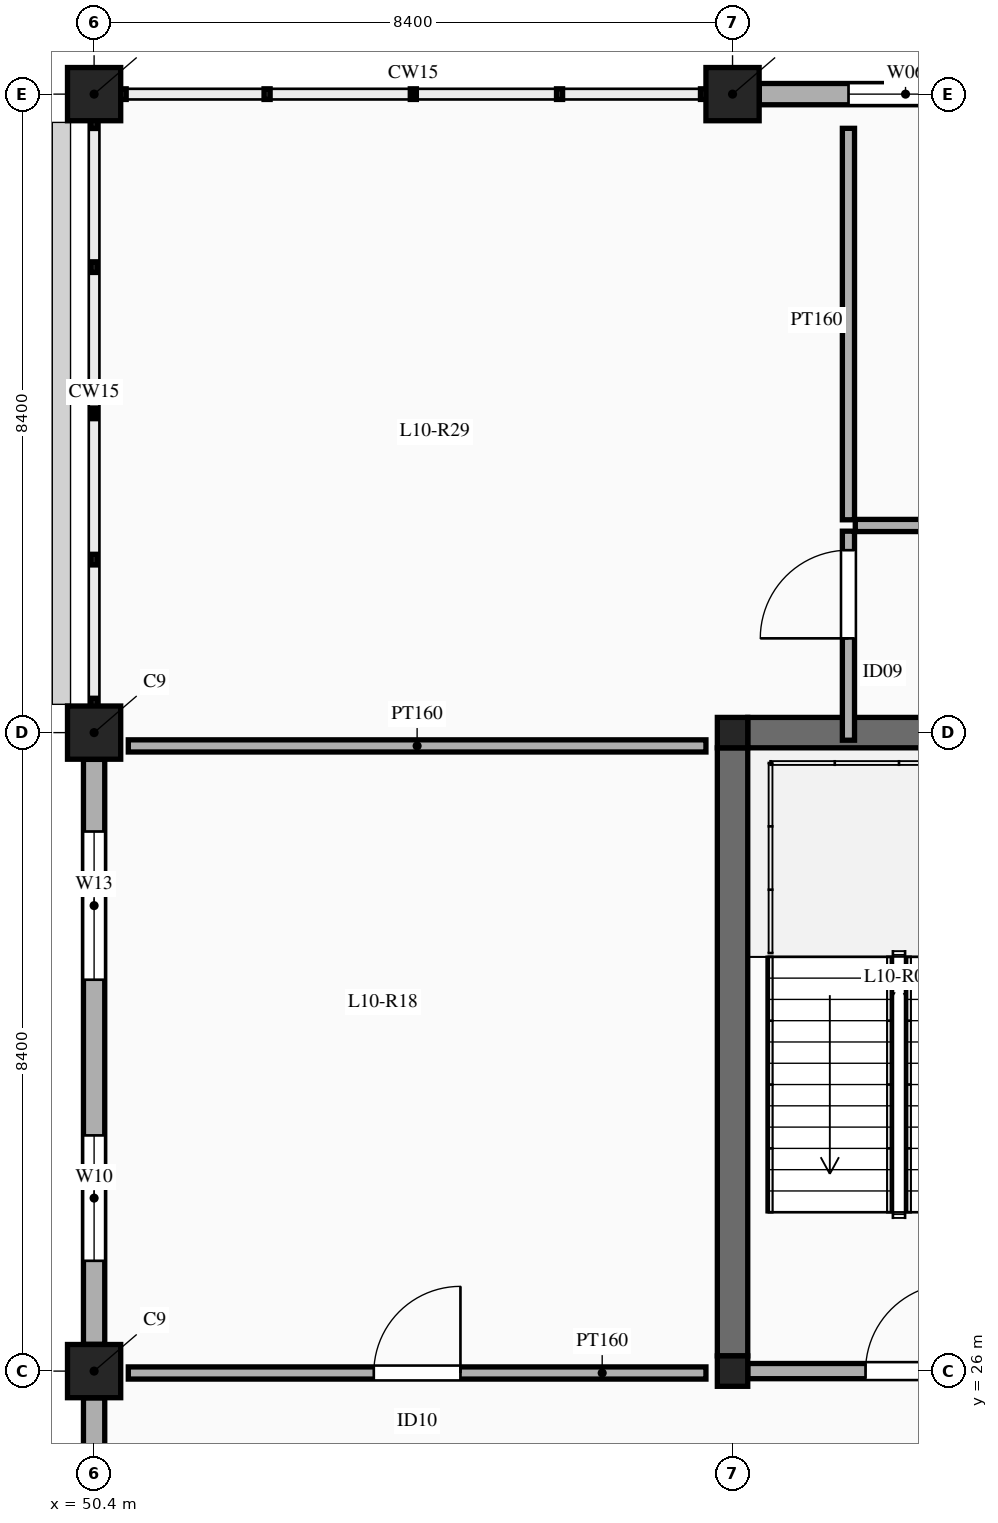
"""IFC4 building model, lengths in metres.
Left out: names, types, materials, properties, quantities, classifications, styles, units other than length and angle.
Written with IfcOpenShell. Run it as: python <this file> out.ifc"""

import sys

from ifc_helpers import new_model, si_unit, direction, frame, frame_2d, origin, origin_2d, place, context, subcontext, project, spatial, rectangle, extrude, element, fill, save


model = new_model("IFC4")
c1 = context("Model", 3, precision=1e-05, world=origin(), true_north=direction((0.0, 1.0)))
c2 = subcontext(c1, "Body", "Model", "MODEL_VIEW")
j1 = project(units=[si_unit("LENGTHUNIT", "METRE"), si_unit("PLANEANGLEUNIT", "RADIAN")], contexts=[c1])
p1 = place(None, origin())
s1 = spatial("IfcSite", under=j1, at=p1, CompositionType="ELEMENT")
p2 = place(p1, origin())
s2 = spatial("IfcBuilding", under=s1, at=p2, CompositionType="ELEMENT")
p3 = place(p2, frame((0.0, 0.0, 46.5)))
s3 = spatial("IfcBuildingStorey", under=s2, at=p3, CompositionType="ELEMENT", Elevation=46.5)
for number, where, z_axis, x_axis in (
    (1, (50.4, 26.0, 0.0), (0.0, 0.0, 1.0), (1.0, 0.0, 0.0)),
    (2, (50.4, 34.4, 0.0), (0.0, 0.0, 1.0), (1.0, 0.0, 0.0)),
    (3, (50.4, 42.8, 0.0), (0.0, 0.0, 1.0), (1.0, 0.0, 0.0)),
):
    element("IfcColumn", number, at=place(p3, frame(where, z_axis=z_axis, x_axis=x_axis)), inside=s3, PredefinedType="COLUMN", context=c2, shape_type="SweptSolid", body=[
        extrude(rectangle(XDim=0.7, YDim=0.7, at=origin_2d()), origin(), (0.0, 0.0, 1.0), 4.5),
    ])
for number, where, z_axis, x_axis in (
    (4, (58.8, 26.0, 0.0), (0.0, 0.0, 1.0), (1.0, 0.0, 0.0)),
    (5, (58.8, 34.4, 0.0), (0.0, 0.0, 1.0), (1.0, 0.0, 0.0)),
):
    element("IfcColumn", number, at=place(p3, frame(where, z_axis=z_axis, x_axis=x_axis)), inside=s3, PredefinedType="COLUMN", context=c2, shape_type="SweptSolid", body=[
        extrude(rectangle(XDim=0.4, YDim=0.4, at=origin_2d()), origin(), (0.0, 0.0, 1.0), 4.5),
    ])
p4 = place(p3, frame((58.8, 42.8, 0.0), z_axis=(0.0, 0.0, 1.0), x_axis=(1.0, 0.0, 0.0)))
e6 = element("IfcColumn", 6, at=p4, inside=s3, PredefinedType="COLUMN", context=c2, shape_type="SweptSolid", body=[
    extrude(rectangle(XDim=0.7, YDim=0.7, at=origin_2d()), origin(), (0.0, 0.0, 1.0), 4.5),
])
for number, where, z_axis, x_axis in (
    (7, (58.8, 26.2, 0.0), (0.0, 0.0, 1.0), (0.0, 1.0, 0.0)),
    (8, (59.0, 34.4, 0.0), (0.0, 0.0, 1.0), (1.0, 0.0, 0.0)),
):
    element("IfcWall", number, at=place(p3, frame(where, z_axis=z_axis, x_axis=x_axis)), inside=s3, PredefinedType="SHEAR", context=c2, shape_type="SweptSolid", body=[
        extrude(rectangle(XDim=8.0, YDim=0.4, at=frame_2d((4.0, 0.0))), origin(), (0.0, 0.0, 1.0), 4.5),
    ])
p5 = place(p3, frame((59.152, 42.8, 0.0), z_axis=(0.0, 0.0, 1.0), x_axis=(1.0, 0.0, 0.0)))
e9 = element("IfcWall", 9, at=p5, inside=s3, PredefinedType="ELEMENTEDWALL", context=c2, shape_type="SweptSolid", body=[
    extrude(rectangle(XDim=7.696, YDim=0.28, at=frame_2d((3.848, 0.0))), origin(), (0.0, 0.0, 1.0), 3.55),
])
p6 = place(p5, frame((1.174, 0.0, 0.9)))
e10 = element("IfcOpeningElement", 10, at=p6, cuts=e9, PredefinedType="OPENING", context=c2, shape_type="SweptSolid", body=[
    extrude(rectangle(XDim=1.5, YDim=2.0, at=frame_2d((0.75, 1.0))), frame((0.0, 0.15, 0.0), z_axis=(0.0, -1.0, 0.0), x_axis=(1.0, 0.0, 0.0)), (0.0, 0.0, 1.0), 0.3),
])
p7 = place(p5, frame((4.747, 0.0, 0.9)))
e11 = element("IfcOpeningElement", 11, at=p7, cuts=e9, PredefinedType="OPENING", context=c2, shape_type="SweptSolid", body=[
    extrude(rectangle(XDim=2.05, YDim=2.1, at=frame_2d((1.025, 1.05))), frame((0.0, 0.15, 0.0), z_axis=(0.0, -1.0, 0.0), x_axis=(1.0, 0.0, 0.0)), (0.0, 0.0, 1.0), 0.3),
])
p8 = place(p3, frame((50.4, 17.952, 0.0), z_axis=(0.0, 0.0, 1.0), x_axis=(0.0, 1.0, 0.0)))
e12 = element("IfcWall", 12, at=p8, inside=s3, PredefinedType="ELEMENTEDWALL", context=c2, shape_type="SweptSolid", body=[
    extrude(rectangle(XDim=7.696, YDim=0.28, at=frame_2d((3.848, 0.0))), origin(), (0.0, 0.0, 1.0), 3.55),
])
p9 = place(p8, frame((1.099, 0.0, 0.9)))
e13 = element("IfcOpeningElement", 13, at=p9, cuts=e12, PredefinedType="OPENING", context=c2, shape_type="SweptSolid", body=[
    extrude(rectangle(XDim=1.65, YDim=1.95, at=frame_2d((0.825, 0.975))), frame((0.0, 0.15, 0.0), z_axis=(0.0, -1.0, 0.0), x_axis=(1.0, 0.0, 0.0)), (0.0, 0.0, 1.0), 0.3),
])
p10 = place(p8, frame((4.797, 0.0, 0.9)))
e14 = element("IfcOpeningElement", 14, at=p10, cuts=e12, PredefinedType="OPENING", context=c2, shape_type="SweptSolid", body=[
    extrude(rectangle(XDim=1.95, YDim=2.0, at=frame_2d((0.975, 1.0))), frame((0.0, 0.15, 0.0), z_axis=(0.0, -1.0, 0.0), x_axis=(1.0, 0.0, 0.0)), (0.0, 0.0, 1.0), 0.3),
])
p11 = place(p3, frame((50.4, 26.352, 0.0), z_axis=(0.0, 0.0, 1.0), x_axis=(0.0, 1.0, 0.0)))
e15 = element("IfcWall", 15, at=p11, inside=s3, PredefinedType="ELEMENTEDWALL", context=c2, shape_type="SweptSolid", body=[
    extrude(rectangle(XDim=7.696, YDim=0.28, at=frame_2d((3.848, 0.0))), origin(), (0.0, 0.0, 1.0), 3.55),
])
p12 = place(p11, frame((1.099, 0.0, 0.9)))
e16 = element("IfcOpeningElement", 16, at=p12, cuts=e15, PredefinedType="OPENING", context=c2, shape_type="SweptSolid", body=[
    extrude(rectangle(XDim=1.65, YDim=1.95, at=frame_2d((0.825, 0.975))), frame((0.0, 0.15, 0.0), z_axis=(0.0, -1.0, 0.0), x_axis=(1.0, 0.0, 0.0)), (0.0, 0.0, 1.0), 0.3),
])
p13 = place(p11, frame((4.797, 0.0, 0.9)))
e17 = element("IfcOpeningElement", 17, at=p13, cuts=e15, PredefinedType="OPENING", context=c2, shape_type="SweptSolid", body=[
    extrude(rectangle(XDim=1.95, YDim=2.0, at=frame_2d((0.975, 1.0))), frame((0.0, 0.15, 0.0), z_axis=(0.0, -1.0, 0.0), x_axis=(1.0, 0.0, 0.0)), (0.0, 0.0, 1.0), 0.3),
])
p14 = place(p3, frame((59.0, 26.0, 0.0), z_axis=(0.0, 0.0, 1.0), x_axis=(1.0, 0.0, 0.0)))
e18 = element("IfcWall", 18, at=p14, inside=s3, PredefinedType="SOLIDWALL", context=c2, shape_type="SweptSolid", body=[
    extrude(rectangle(XDim=8.0, YDim=0.2, at=frame_2d((4.0, 0.0))), origin(), (0.0, 0.0, 1.0), 3.83),
])
p15 = place(p14, frame((1.55, 0.0, 0.0)))
e19 = element("IfcOpeningElement", 19, at=p15, cuts=e18, PredefinedType="OPENING", context=c2, shape_type="SweptSolid", body=[
    extrude(rectangle(XDim=1.15, YDim=2.15, at=frame_2d((0.575, 1.075))), frame((0.0, 0.11, 0.0), z_axis=(0.0, -1.0, 0.0), x_axis=(1.0, 0.0, 0.0)), (0.0, 0.0, 1.0), 0.22),
])
p16 = place(p14, frame((5.35, 0.0, 0.0)))
e20 = element("IfcOpeningElement", 20, at=p16, cuts=e18, PredefinedType="OPENING", context=c2, shape_type="SweptSolid", body=[
    extrude(rectangle(XDim=1.22, YDim=2.15, at=frame_2d((0.61, 1.075))), frame((0.0, 0.11, 0.0), z_axis=(0.0, -1.0, 0.0), x_axis=(1.0, 0.0, 0.0)), (0.0, 0.0, 1.0), 0.22),
])
p17 = place(p3, frame((50.85, 25.975, 0.0), z_axis=(0.0, 0.0, 1.0), x_axis=(1.0, 0.0, 0.0)))
e21 = element("IfcWall", 21, at=p17, inside=s3, PredefinedType="PARTITIONING", context=c2, shape_type="SweptSolid", body=[
    extrude(rectangle(XDim=7.6, YDim=0.16, at=frame_2d((3.8, 0.0))), origin(), (0.0, 0.0, 1.0), 3.45),
])
p18 = place(p17, frame((3.23, 0.0, 0.0)))
e22 = element("IfcOpeningElement", 22, at=p18, cuts=e21, PredefinedType="OPENING", context=c2, shape_type="SweptSolid", body=[
    extrude(rectangle(XDim=1.14, YDim=2.22, at=frame_2d((0.57, 1.11))), frame((0.0, 0.09, 0.0), z_axis=(0.0, -1.0, 0.0), x_axis=(1.0, 0.0, 0.0)), (0.0, 0.0, 1.0), 0.18),
])
p19 = place(p3, frame((50.85, 34.225, 0.0), z_axis=(0.0, 0.0, 1.0), x_axis=(1.0, 0.0, 0.0)))
e23 = element("IfcWall", 23, at=p19, inside=s3, PredefinedType="PARTITIONING", context=c2, shape_type="SweptSolid", body=[
    extrude(rectangle(XDim=7.6, YDim=0.16, at=frame_2d((3.8, 0.0))), origin(), (0.0, 0.0, 1.0), 3.45),
])
p20 = place(p3, frame((60.325, 34.3, 0.0), z_axis=(0.0, 0.0, 1.0), x_axis=(0.0, 1.0, 0.0)))
e24 = element("IfcWall", 24, at=p20, inside=s3, PredefinedType="PARTITIONING", context=c2, shape_type="SweptSolid", body=[
    extrude(rectangle(XDim=2.75, YDim=0.16, at=frame_2d((1.375, 0.0))), origin(), (0.0, 0.0, 1.0), 3.45),
])
p21 = place(p20, frame((1.34, 0.0, 0.0)))
e25 = element("IfcOpeningElement", 25, at=p21, cuts=e24, PredefinedType="OPENING", context=c2, shape_type="SweptSolid", body=[
    extrude(rectangle(XDim=1.16, YDim=2.2, at=frame_2d((0.58, 1.1))), frame((0.0, 0.09, 0.0), z_axis=(0.0, -1.0, 0.0), x_axis=(1.0, 0.0, 0.0)), (0.0, 0.0, 1.0), 0.18),
])
p22 = place(p3, frame((60.415, 37.125, 0.0), z_axis=(0.0, 0.0, 1.0), x_axis=(1.0, 0.0, 0.0)))
e26 = element("IfcWall", 26, at=p22, inside=s3, PredefinedType="PARTITIONING", context=c2, shape_type="SweptSolid", body=[
    extrude(rectangle(XDim=16.385, YDim=0.16, at=frame_2d((8.192, 0.0))), origin(), (0.0, 0.0, 1.0), 3.45),
])
p23 = place(p22, frame((8.613, 0.0, 0.0)))
e27 = element("IfcOpeningElement", 27, at=p23, cuts=e26, PredefinedType="OPENING", context=c2, shape_type="SweptSolid", body=[
    extrude(rectangle(XDim=1.1, YDim=2.2, at=frame_2d((0.55, 1.1))), frame((0.0, 0.09, 0.0), z_axis=(0.0, -1.0, 0.0), x_axis=(1.0, 0.0, 0.0)), (0.0, 0.0, 1.0), 0.18),
])
p24 = place(p3, frame((60.325, 37.2, 0.0), z_axis=(0.0, 0.0, 1.0), x_axis=(0.0, 1.0, 0.0)))
e28 = element("IfcWall", 28, at=p24, inside=s3, PredefinedType="PARTITIONING", context=c2, shape_type="SweptSolid", body=[
    extrude(rectangle(XDim=5.15, YDim=0.16, at=frame_2d((2.575, 0.0))), origin(), (0.0, 0.0, 1.0), 3.45),
])
p25 = place(p6, origin())
e29 = element("IfcWindow", 29, at=p25, inside=s3, PartitioningType="DOUBLE_PANEL_VERTICAL", PredefinedType="WINDOW", context=c2, shape_type="SweptSolid", body=[
    extrude(rectangle(XDim=1.5, YDim=2.0, at=frame_2d((0.75, 1.0))), frame((0.0, 0.03, 0.0), z_axis=(0.0, -1.0, 0.0), x_axis=(1.0, 0.0, 0.0)), (0.0, 0.0, 1.0), 0.06),
])
fill(e10, e29)
p26 = place(p12, origin())
e30 = element("IfcWindow", 30, at=p26, inside=s3, PartitioningType="DOUBLE_PANEL_HORIZONTAL", PredefinedType="WINDOW", context=c2, shape_type="SweptSolid", body=[
    extrude(rectangle(XDim=1.65, YDim=1.95, at=frame_2d((0.825, 0.975))), frame((0.0, 0.03, 0.0), z_axis=(0.0, -1.0, 0.0), x_axis=(1.0, 0.0, 0.0)), (0.0, 0.0, 1.0), 0.06),
])
fill(e16, e30)
p27 = place(p13, origin())
e31 = element("IfcWindow", 31, at=p27, inside=s3, PartitioningType="TRIPLE_PANEL_VERTICAL", PredefinedType="WINDOW", context=c2, shape_type="SweptSolid", body=[
    extrude(rectangle(XDim=1.95, YDim=2.0, at=frame_2d((0.975, 1.0))), frame((0.0, 0.03, 0.0), z_axis=(0.0, -1.0, 0.0), x_axis=(1.0, 0.0, 0.0)), (0.0, 0.0, 1.0), 0.06),
])
fill(e17, e31)
p28 = place(p15, origin())
e32 = element("IfcDoor", 32, at=p28, inside=s3, OperationType="SINGLE_SWING_RIGHT", PredefinedType="DOOR", context=c2, shape_type="SweptSolid", body=[
    extrude(rectangle(XDim=1.15, YDim=2.15, at=frame_2d((0.575, 1.075))), frame((0.0, 0.025, 0.0), z_axis=(0.0, -1.0, 0.0), x_axis=(1.0, 0.0, 0.0)), (0.0, 0.0, 1.0), 0.05),
])
fill(e19, e32)
p29 = place(p18, origin())
e33 = element("IfcDoor", 33, at=p29, inside=s3, OperationType="SINGLE_SWING_RIGHT", PredefinedType="DOOR", context=c2, shape_type="SweptSolid", body=[
    extrude(rectangle(XDim=1.14, YDim=2.22, at=frame_2d((0.57, 1.11))), frame((0.0, 0.025, 0.0), z_axis=(0.0, -1.0, 0.0), x_axis=(1.0, 0.0, 0.0)), (0.0, 0.0, 1.0), 0.05),
])
fill(e22, e33)
p30 = place(p21, origin())
e34 = element("IfcDoor", 34, at=p30, inside=s3, OperationType="SINGLE_SWING_LEFT", PredefinedType="DOOR", context=c2, shape_type="SweptSolid", body=[
    extrude(rectangle(XDim=1.16, YDim=2.2, at=frame_2d((0.58, 1.1))), frame((0.0, 0.025, 0.0), z_axis=(0.0, -1.0, 0.0), x_axis=(1.0, 0.0, 0.0)), (0.0, 0.0, 1.0), 0.05),
])
fill(e25, e34)
save(model, sys.argv[1])
